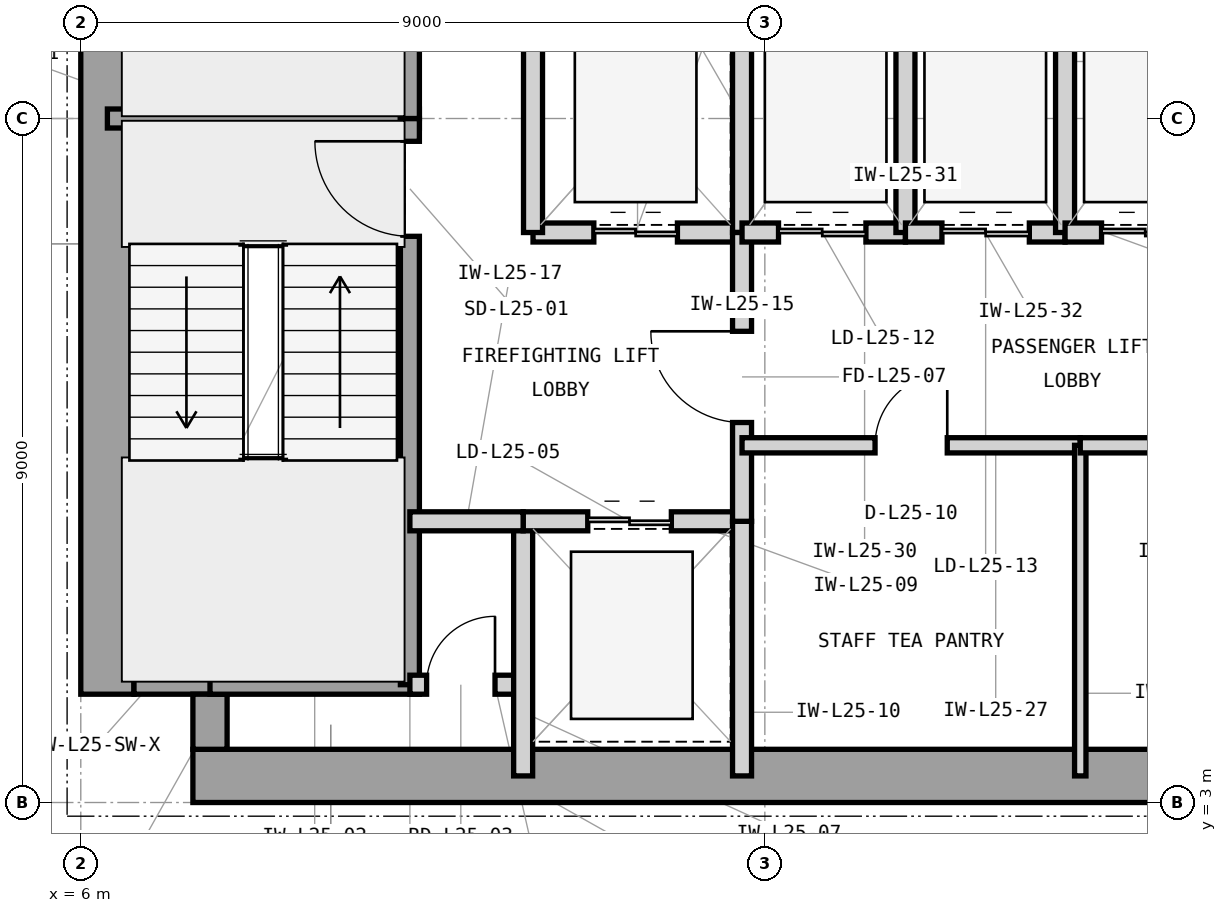
"""IFC4 building model, lengths in metres.
Left out: names, types, materials, properties, quantities, classifications, styles, units other than length and angle.
Written with IfcOpenShell. Run it as: python <this file> out.ifc"""

import sys

from ifc_helpers import new_model, si_unit, direction, frame, frame_2d, origin, place, context, subcontext, project, spatial, rectangle, extrude, element, fill, save


model = new_model("IFC4")
c1 = context("Model", 3, precision=1e-05, world=origin(), true_north=direction((0.0, 1.0)))
c2 = subcontext(c1, "Body", "Model", "MODEL_VIEW")
j1 = project(units=[si_unit("LENGTHUNIT", "METRE"), si_unit("PLANEANGLEUNIT", "RADIAN")], contexts=[c1])
p1 = place(None, origin())
s1 = spatial("IfcSite", under=j1, at=p1, CompositionType="ELEMENT")
p2 = place(p1, origin())
s2 = spatial("IfcBuilding", under=s1, at=p2, CompositionType="ELEMENT")
p3 = place(p2, frame((0.0, 0.0, 108.9)))
s3 = spatial("IfcBuildingStorey", under=s2, at=p3, CompositionType="ELEMENT", Elevation=108.9)
p4 = place(p3, frame((7.475, 3.35, 0.0), z_axis=(0.0, 0.0, 1.0), x_axis=(1.0, 0.0, 0.0)))
e1 = element("IfcWall", 1, at=p4, inside=s3, PredefinedType="SHEAR", context=c2, shape_type="SweptSolid", body=[
    extrude(rectangle(XDim=16.525, YDim=0.7, at=frame_2d((8.262, 0.0))), origin(), (0.0, 0.0, 1.0), 3.9),
])
p5 = place(p3, frame((6.35, 4.425, 0.0), z_axis=(0.0, 0.0, 1.0), x_axis=(0.0, 1.0, 0.0)))
e2 = element("IfcWall", 2, at=p5, inside=s3, PredefinedType="SHEAR", context=c2, shape_type="SweptSolid", body=[
    extrude(rectangle(XDim=15.15, YDim=0.7, at=frame_2d((7.575, 0.0))), origin(), (0.0, 0.0, 1.0), 3.9),
])
p6 = place(p3, frame((6.7, 4.65, 0.0), z_axis=(0.0, 0.0, 1.0), x_axis=(1.0, 0.0, 0.0)))
e3 = element("IfcWall", 3, at=p6, inside=s3, PredefinedType="SHEAR", context=c2, shape_type="SweptSolid", body=[
    extrude(rectangle(XDim=1.225, YDim=0.45, at=frame_2d((0.613, 0.0))), origin(), (0.0, 0.0, 1.0), 3.9),
])
p7 = place(p3, frame((7.7, 3.7, 0.0), z_axis=(0.0, 0.0, 1.0), x_axis=(0.0, 1.0, 0.0)))
e4 = element("IfcWall", 4, at=p7, inside=s3, PredefinedType="SHEAR", context=c2, shape_type="SweptSolid", body=[
    extrude(rectangle(XDim=0.725, YDim=0.45, at=frame_2d((0.363, 0.0))), origin(), (0.0, 0.0, 1.0), 3.9),
])
p8 = place(p3, frame((6.35, 12.0, 0.0), z_axis=(0.0, 0.0, 1.0), x_axis=(1.0, 0.0, 0.0)))
e5 = element("IfcWall", 5, at=p8, inside=s3, PredefinedType="SHEAR", context=c2, shape_type="SweptSolid", body=[
    extrude(rectangle(XDim=4.105, YDim=0.25, at=frame_2d((2.052, 0.0))), origin(), (0.0, 0.0, 1.0), 3.9),
])
p9 = place(p3, frame((7.7, 4.55, 0.0), z_axis=(0.0, 0.0, 1.0), x_axis=(1.0, 0.0, 0.0)))
e6 = element("IfcWall", 6, at=p9, inside=s3, PredefinedType="SHEAR", context=c2, shape_type="SweptSolid", body=[
    extrude(rectangle(XDim=2.755, YDim=0.25, at=frame_2d((1.377, 0.0))), origin(), (0.0, 0.0, 1.0), 3.9),
])
p10 = place(p3, frame((10.33, 4.55, 0.0), z_axis=(0.0, 0.0, 1.0), x_axis=(0.0, 1.0, 0.0)))
e7 = element("IfcWall", 7, at=p10, inside=s3, PredefinedType="SHEAR", context=c2, shape_type="SweptSolid", body=[
    extrude(rectangle(XDim=7.45, YDim=0.25, at=frame_2d((3.725, 0.0))), origin(), (0.0, 0.0, 1.0), 3.9),
])
p11 = place(p10, frame((5.9, 0.0, 0.0)))
e8 = element("IfcOpeningElement", 8, at=p11, cuts=e7, PredefinedType="OPENING", context=c2, shape_type="SweptSolid", body=[
    extrude(rectangle(XDim=1.25, YDim=2.2, at=frame_2d((0.625, 1.1))), frame((0.0, 0.135, 0.0), z_axis=(0.0, -1.0, 0.0), x_axis=(1.0, 0.0, 0.0)), (0.0, 0.0, 1.0), 0.27),
])
p12 = place(p3, frame((10.33, 12.0, 0.0), z_axis=(0.0, 0.0, 1.0), x_axis=(0.0, 1.0, 0.0)))
e9 = element("IfcWall", 9, at=p12, inside=s3, PredefinedType="SHEAR", context=c2, shape_type="SweptSolid", body=[
    extrude(rectangle(XDim=7.45, YDim=0.25, at=frame_2d((3.725, 0.0))), origin(), (0.0, 0.0, 1.0), 3.9),
])
p13 = place(p12, frame((5.85, 0.0, 0.0)))
e10 = element("IfcOpeningElement", 10, at=p13, cuts=e9, PredefinedType="OPENING", context=c2, shape_type="SweptSolid", body=[
    extrude(rectangle(XDim=1.25, YDim=2.2, at=frame_2d((0.625, 1.1))), frame((0.0, 0.135, 0.0), z_axis=(0.0, -1.0, 0.0), x_axis=(1.0, 0.0, 0.0)), (0.0, 0.0, 1.0), 0.27),
])
p14 = place(p3, frame((10.33, 4.55, 0.0), z_axis=(0.0, 0.0, 1.0), x_axis=(1.0, 0.0, 0.0)))
e11 = element("IfcWall", 11, at=p14, inside=s3, PredefinedType="PARTITIONING", context=c2, shape_type="SweptSolid", body=[
    extrude(rectangle(XDim=1.49, YDim=0.25, at=frame_2d((0.745, 0.0))), origin(), (0.0, 0.0, 1.0), 3.69),
])
p15 = place(p14, frame((0.22, 0.0, 0.0)))
e12 = element("IfcOpeningElement", 12, at=p15, cuts=e11, PredefinedType="OPENING", context=c2, shape_type="SweptSolid", body=[
    extrude(rectangle(XDim=0.9, YDim=2.1, at=frame_2d((0.45, 1.05))), frame((0.0, 0.135, 0.0), z_axis=(0.0, -1.0, 0.0), x_axis=(1.0, 0.0, 0.0)), (0.0, 0.0, 1.0), 0.27),
])
p16 = place(p3, frame((11.82, 3.35, 0.0), z_axis=(0.0, 0.0, 1.0), x_axis=(0.0, 1.0, 0.0)))
e13 = element("IfcWall", 13, at=p16, inside=s3, PredefinedType="PARTITIONING", context=c2, shape_type="SweptSolid", body=[
    extrude(rectangle(XDim=3.35, YDim=0.25, at=frame_2d((1.675, 0.0))), origin(), (0.0, 0.0, 1.0), 3.69),
])
p17 = place(p3, frame((11.82, 6.7, 0.0), z_axis=(0.0, 0.0, 1.0), x_axis=(1.0, 0.0, 0.0)))
e14 = element("IfcWall", 14, at=p17, inside=s3, PredefinedType="PARTITIONING", context=c2, shape_type="SweptSolid", body=[
    extrude(rectangle(XDim=2.88, YDim=0.25, at=frame_2d((1.44, 0.0))), origin(), (0.0, 0.0, 1.0), 3.227),
])
p18 = place(p17, frame((0.85, 0.0, 0.0)))
e15 = element("IfcOpeningElement", 15, at=p18, cuts=e14, PredefinedType="OPENING", context=c2, shape_type="SweptSolid", body=[
    extrude(rectangle(XDim=1.1, YDim=2.25, at=frame_2d((0.55, 1.125))), frame((0.0, 0.135, 0.0), z_axis=(0.0, -1.0, 0.0), x_axis=(1.0, 0.0, 0.0)), (0.0, 0.0, 1.0), 0.27),
])
p19 = place(p3, frame((14.7, 3.35, 0.0), z_axis=(0.0, 0.0, 1.0), x_axis=(0.0, 1.0, 0.0)))
e16 = element("IfcWall", 16, at=p19, inside=s3, PredefinedType="PARTITIONING", context=c2, shape_type="SweptSolid", body=[
    extrude(rectangle(XDim=3.35, YDim=0.25, at=frame_2d((1.675, 0.0))), origin(), (0.0, 0.0, 1.0), 3.69),
])
p20 = place(p3, frame((11.95, 10.5, 0.0), z_axis=(0.0, 0.0, 1.0), x_axis=(1.0, 0.0, 0.0)))
e17 = element("IfcWall", 17, at=p20, inside=s3, PredefinedType="PARTITIONING", context=c2, shape_type="SweptSolid", body=[
    extrude(rectangle(XDim=2.75, YDim=0.25, at=frame_2d((1.375, 0.0))), origin(), (0.0, 0.0, 1.0), 3.227),
])
p21 = place(p20, frame((0.8, 0.0, 0.0)))
e18 = element("IfcOpeningElement", 18, at=p21, cuts=e17, PredefinedType="OPENING", context=c2, shape_type="SweptSolid", body=[
    extrude(rectangle(XDim=1.1, YDim=2.25, at=frame_2d((0.55, 1.125))), frame((0.0, 0.135, 0.0), z_axis=(0.0, -1.0, 0.0), x_axis=(1.0, 0.0, 0.0)), (0.0, 0.0, 1.0), 0.27),
])
for number, where, z_axis, x_axis in (
    (19, (11.95, 10.5, 0.0), (0.0, 0.0, 1.0), (0.0, 1.0, 0.0)),
    (20, (14.7, 10.5, 0.0), (0.0, 0.0, 1.0), (0.0, 1.0, 0.0)),
):
    element("IfcWall", number, at=place(p3, frame(where, z_axis=z_axis, x_axis=x_axis)), inside=s3, PredefinedType="PARTITIONING", context=c2, shape_type="SweptSolid", body=[
        extrude(rectangle(XDim=3.0, YDim=0.25, at=frame_2d((1.5, 0.0))), origin(), (0.0, 0.0, 1.0), 3.69),
    ])
p22 = place(p3, frame((14.7, 6.7, 0.0), z_axis=(0.0, 0.0, 1.0), x_axis=(0.0, 1.0, 0.0)))
e21 = element("IfcWall", 21, at=p22, inside=s3, PredefinedType="PARTITIONING", context=c2, shape_type="SweptSolid", body=[
    extrude(rectangle(XDim=3.8, YDim=0.25, at=frame_2d((1.9, 0.0))), origin(), (0.0, 0.0, 1.0), 3.69),
])
p23 = place(p22, frame((1.3, 0.0, 0.0)))
e22 = element("IfcOpeningElement", 22, at=p23, cuts=e21, PredefinedType="OPENING", context=c2, shape_type="SweptSolid", body=[
    extrude(rectangle(XDim=1.2, YDim=2.2, at=frame_2d((0.6, 1.1))), frame((0.0, 0.135, 0.0), z_axis=(0.0, -1.0, 0.0), x_axis=(1.0, 0.0, 0.0)), (0.0, 0.0, 1.0), 0.27),
])
p24 = place(p3, frame((10.33, 6.7, 0.0), z_axis=(0.0, 0.0, 1.0), x_axis=(1.0, 0.0, 0.0)))
e23 = element("IfcWall", 23, at=p24, inside=s3, PredefinedType="PARTITIONING", context=c2, shape_type="SweptSolid", body=[
    extrude(rectangle(XDim=1.49, YDim=0.25, at=frame_2d((0.745, 0.0))), origin(), (0.0, 0.0, 1.0), 3.227),
])
p25 = place(p3, frame((14.7, 7.7, 0.0), z_axis=(0.0, 0.0, 1.0), x_axis=(1.0, 0.0, 0.0)))
e24 = element("IfcWall", 24, at=p25, inside=s3, PredefinedType="PARTITIONING", context=c2, shape_type="SweptSolid", body=[
    extrude(rectangle(XDim=4.45, YDim=0.2, at=frame_2d((2.225, 0.0))), origin(), (0.0, 0.0, 1.0), 3.69),
])
p26 = place(p25, frame((1.75, 0.0, 0.0)))
e25 = element("IfcOpeningElement", 25, at=p26, cuts=e24, PredefinedType="OPENING", context=c2, shape_type="SweptSolid", body=[
    extrude(rectangle(XDim=0.95, YDim=2.1, at=frame_2d((0.475, 1.05))), frame((0.0, 0.11, 0.0), z_axis=(0.0, -1.0, 0.0), x_axis=(1.0, 0.0, 0.0)), (0.0, 0.0, 1.0), 0.22),
])
p27 = place(p3, frame((19.15, 3.35, 0.0), z_axis=(0.0, 0.0, 1.0), x_axis=(0.0, 1.0, 0.0)))
e26 = element("IfcWall", 26, at=p27, inside=s3, PredefinedType="PARTITIONING", context=c2, shape_type="SweptSolid", body=[
    extrude(rectangle(XDim=4.35, YDim=0.15, at=frame_2d((2.175, 0.0))), origin(), (0.0, 0.0, 1.0), 3.69),
])
p28 = place(p3, frame((19.15, 7.7, 0.0), z_axis=(0.0, 0.0, 1.0), x_axis=(1.0, 0.0, 0.0)))
e27 = element("IfcWall", 27, at=p28, inside=s3, PredefinedType="PARTITIONING", context=c2, shape_type="SweptSolid", body=[
    extrude(rectangle(XDim=4.5, YDim=0.2, at=frame_2d((2.25, 0.0))), origin(), (0.0, 0.0, 1.0), 3.69),
])
p29 = place(p28, frame((1.75, 0.0, 0.0)))
e28 = element("IfcOpeningElement", 28, at=p29, cuts=e27, PredefinedType="OPENING", context=c2, shape_type="SweptSolid", body=[
    extrude(rectangle(XDim=1.0, YDim=2.15, at=frame_2d((0.5, 1.075))), frame((0.0, 0.11, 0.0), z_axis=(0.0, -1.0, 0.0), x_axis=(1.0, 0.0, 0.0)), (0.0, 0.0, 1.0), 0.22),
])
p30 = place(p3, frame((14.7, 10.5, 0.0), z_axis=(0.0, 0.0, 1.0), x_axis=(1.0, 0.0, 0.0)))
e29 = element("IfcWall", 29, at=p30, inside=s3, PredefinedType="PARTITIONING", context=c2, shape_type="SweptSolid", body=[
    extrude(rectangle(XDim=2.15, YDim=0.25, at=frame_2d((1.075, 0.0))), origin(), (0.0, 0.0, 1.0), 3.227),
])
p31 = place(p30, frame((0.48, 0.0, 0.0)))
e30 = element("IfcOpeningElement", 30, at=p31, cuts=e29, PredefinedType="OPENING", context=c2, shape_type="SweptSolid", body=[
    extrude(rectangle(XDim=1.15, YDim=2.25, at=frame_2d((0.575, 1.125))), frame((0.0, 0.135, 0.0), z_axis=(0.0, -1.0, 0.0), x_axis=(1.0, 0.0, 0.0)), (0.0, 0.0, 1.0), 0.27),
])
p32 = place(p3, frame((16.85, 10.5, 0.0), z_axis=(0.0, 0.0, 1.0), x_axis=(0.0, 1.0, 0.0)))
e31 = element("IfcWall", 31, at=p32, inside=s3, PredefinedType="PARTITIONING", context=c2, shape_type="SweptSolid", body=[
    extrude(rectangle(XDim=3.0, YDim=0.25, at=frame_2d((1.5, 0.0))), origin(), (0.0, 0.0, 1.0), 3.69),
])
p33 = place(p3, frame((16.85, 10.5, 0.0), z_axis=(0.0, 0.0, 1.0), x_axis=(1.0, 0.0, 0.0)))
e32 = element("IfcWall", 32, at=p33, inside=s3, PredefinedType="PARTITIONING", context=c2, shape_type="SweptSolid", body=[
    extrude(rectangle(XDim=2.1, YDim=0.25, at=frame_2d((1.05, 0.0))), origin(), (0.0, 0.0, 1.0), 3.227),
])
p34 = place(p33, frame((0.48, 0.0, 0.0)))
e33 = element("IfcOpeningElement", 33, at=p34, cuts=e32, PredefinedType="OPENING", context=c2, shape_type="SweptSolid", body=[
    extrude(rectangle(XDim=1.15, YDim=2.25, at=frame_2d((0.575, 1.125))), frame((0.0, 0.135, 0.0), z_axis=(0.0, -1.0, 0.0), x_axis=(1.0, 0.0, 0.0)), (0.0, 0.0, 1.0), 0.27),
])
p35 = place(p3, frame((18.95, 10.5, 0.0), z_axis=(0.0, 0.0, 1.0), x_axis=(0.0, 1.0, 0.0)))
e34 = element("IfcWall", 34, at=p35, inside=s3, PredefinedType="PARTITIONING", context=c2, shape_type="SweptSolid", body=[
    extrude(rectangle(XDim=3.0, YDim=0.25, at=frame_2d((1.5, 0.0))), origin(), (0.0, 0.0, 1.0), 3.69),
])
p36 = place(p3, frame((18.95, 10.5, 0.0), z_axis=(0.0, 0.0, 1.0), x_axis=(1.0, 0.0, 0.0)))
e35 = element("IfcWall", 35, at=p36, inside=s3, PredefinedType="PARTITIONING", context=c2, shape_type="SweptSolid", body=[
    extrude(rectangle(XDim=2.1, YDim=0.25, at=frame_2d((1.05, 0.0))), origin(), (0.0, 0.0, 1.0), 3.227),
])
p37 = place(p36, frame((0.48, 0.0, 0.0)))
e36 = element("IfcOpeningElement", 36, at=p37, cuts=e35, PredefinedType="OPENING", context=c2, shape_type="SweptSolid", body=[
    extrude(rectangle(XDim=1.15, YDim=2.25, at=frame_2d((0.575, 1.125))), frame((0.0, 0.135, 0.0), z_axis=(0.0, -1.0, 0.0), x_axis=(1.0, 0.0, 0.0)), (0.0, 0.0, 1.0), 0.27),
])
p38 = place(p11, origin())
e37 = element("IfcDoor", 37, at=p38, inside=s3, OperationType="SINGLE_SWING_RIGHT", PredefinedType="DOOR", context=c2, shape_type="SweptSolid", body=[
    extrude(rectangle(XDim=1.25, YDim=2.2, at=frame_2d((0.625, 1.1))), frame((0.0, 0.025, 0.0), z_axis=(0.0, -1.0, 0.0), x_axis=(1.0, 0.0, 0.0)), (0.0, 0.0, 1.0), 0.05),
])
fill(e8, e37)
p39 = place(p15, origin())
e38 = element("IfcDoor", 38, at=p39, inside=s3, OperationType="SINGLE_SWING_RIGHT", PredefinedType="TRAPDOOR", context=c2, shape_type="SweptSolid", body=[
    extrude(rectangle(XDim=0.9, YDim=2.1, at=frame_2d((0.45, 1.05))), frame((0.0, 0.025, 0.0), z_axis=(0.0, -1.0, 0.0), x_axis=(1.0, 0.0, 0.0)), (0.0, 0.0, 1.0), 0.05),
])
fill(e12, e38)
p40 = place(p18, origin())
e39 = element("IfcDoor", 39, at=p40, inside=s3, OperationType="DOUBLE_DOOR_SLIDING", PredefinedType="DOOR", context=c2, shape_type="SweptSolid", body=[
    extrude(rectangle(XDim=1.1, YDim=2.25, at=frame_2d((0.55, 1.125))), frame((0.0, 0.025, 0.0), z_axis=(0.0, -1.0, 0.0), x_axis=(1.0, 0.0, 0.0)), (0.0, 0.0, 1.0), 0.05),
])
fill(e15, e39)
p41 = place(p21, origin())
e40 = element("IfcDoor", 40, at=p41, inside=s3, OperationType="DOUBLE_DOOR_SLIDING", PredefinedType="DOOR", context=c2, shape_type="SweptSolid", body=[
    extrude(rectangle(XDim=1.1, YDim=2.25, at=frame_2d((0.55, 1.125))), frame((0.0, 0.025, 0.0), z_axis=(0.0, -1.0, 0.0), x_axis=(1.0, 0.0, 0.0)), (0.0, 0.0, 1.0), 0.05),
])
fill(e18, e40)
p42 = place(p23, origin())
e41 = element("IfcDoor", 41, at=p42, inside=s3, OperationType="SINGLE_SWING_RIGHT", PredefinedType="DOOR", context=c2, shape_type="SweptSolid", body=[
    extrude(rectangle(XDim=1.2, YDim=2.2, at=frame_2d((0.6, 1.1))), frame((0.0, 0.025, 0.0), z_axis=(0.0, -1.0, 0.0), x_axis=(1.0, 0.0, 0.0)), (0.0, 0.0, 1.0), 0.05),
])
fill(e22, e41)
p43 = place(p26, origin())
e42 = element("IfcDoor", 42, at=p43, inside=s3, OperationType="SINGLE_SWING_RIGHT", PredefinedType="DOOR", context=c2, shape_type="SweptSolid", body=[
    extrude(rectangle(XDim=0.95, YDim=2.1, at=frame_2d((0.475, 1.05))), frame((0.0, 0.025, 0.0), z_axis=(0.0, -1.0, 0.0), x_axis=(1.0, 0.0, 0.0)), (0.0, 0.0, 1.0), 0.05),
])
fill(e25, e42)
p44 = place(p31, origin())
e43 = element("IfcDoor", 43, at=p44, inside=s3, OperationType="DOUBLE_DOOR_SLIDING", PredefinedType="DOOR", context=c2, shape_type="SweptSolid", body=[
    extrude(rectangle(XDim=1.15, YDim=2.25, at=frame_2d((0.575, 1.125))), frame((0.0, 0.025, 0.0), z_axis=(0.0, -1.0, 0.0), x_axis=(1.0, 0.0, 0.0)), (0.0, 0.0, 1.0), 0.05),
])
fill(e30, e43)
p45 = place(p34, origin())
e44 = element("IfcDoor", 44, at=p45, inside=s3, OperationType="DOUBLE_DOOR_SLIDING", PredefinedType="DOOR", context=c2, shape_type="SweptSolid", body=[
    extrude(rectangle(XDim=1.15, YDim=2.25, at=frame_2d((0.575, 1.125))), frame((0.0, 0.025, 0.0), z_axis=(0.0, -1.0, 0.0), x_axis=(1.0, 0.0, 0.0)), (0.0, 0.0, 1.0), 0.05),
])
fill(e33, e44)
p46 = place(p37, origin())
e45 = element("IfcDoor", 45, at=p46, inside=s3, OperationType="DOUBLE_DOOR_SLIDING", PredefinedType="DOOR", context=c2, shape_type="SweptSolid", body=[
    extrude(rectangle(XDim=1.15, YDim=2.25, at=frame_2d((0.575, 1.125))), frame((0.0, 0.025, 0.0), z_axis=(0.0, -1.0, 0.0), x_axis=(1.0, 0.0, 0.0)), (0.0, 0.0, 1.0), 0.05),
])
fill(e36, e45)
save(model, sys.argv[1])
